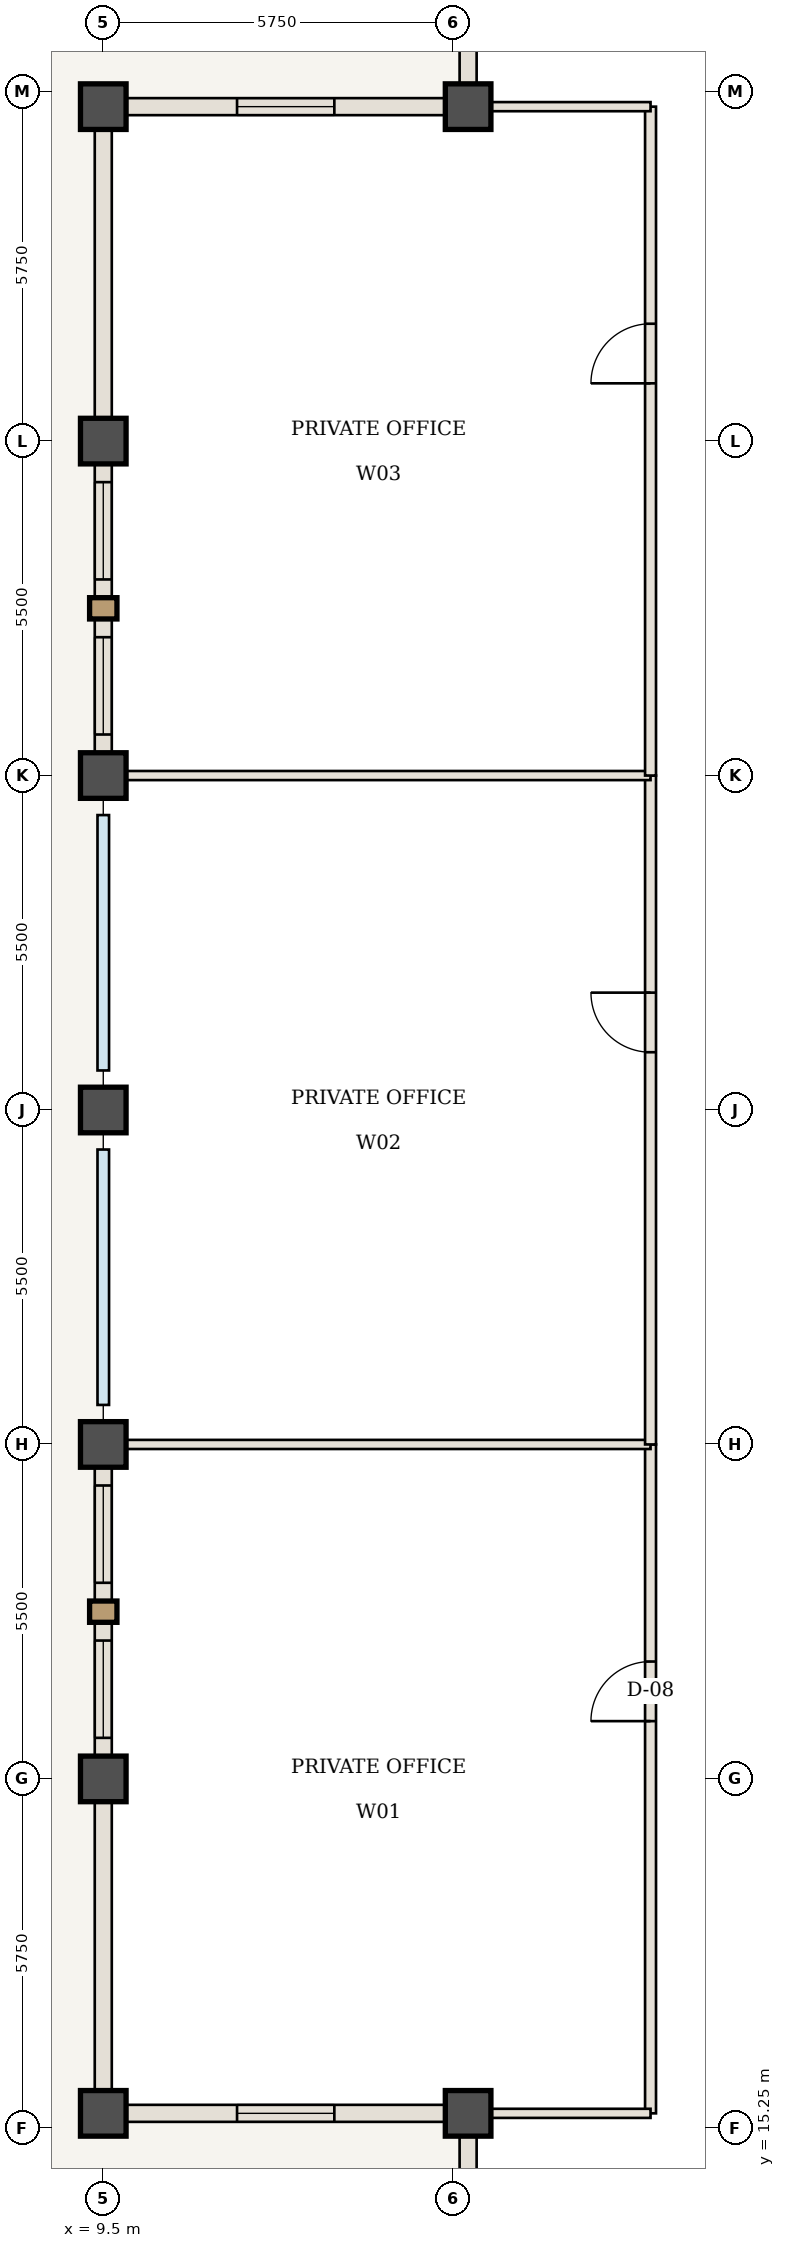
"""IFC4 building model, lengths in metres.
Left out: names, types, materials, properties, quantities, classifications, styles, units other than length and angle.
Written with IfcOpenShell. Run it as: python <this file> out.ifc"""

import sys

from ifc_helpers import new_model, si_unit, direction, frame, frame_2d, origin, origin_2d, place, context, subcontext, project, spatial, rectangle, extrude, element, fill, save


model = new_model("IFC4")
c1 = context("Model", 3, precision=1e-05, world=origin(), true_north=direction((0.0, 1.0)))
c2 = subcontext(c1, "Body", "Model", "MODEL_VIEW")
j1 = project(units=[si_unit("LENGTHUNIT", "METRE"), si_unit("PLANEANGLEUNIT", "RADIAN")], contexts=[c1])
p1 = place(None, origin())
s1 = spatial("IfcSite", under=j1, at=p1, CompositionType="ELEMENT")
p2 = place(p1, origin())
s2 = spatial("IfcBuilding", under=s1, at=p2, CompositionType="ELEMENT")
p3 = place(p2, frame((0.0, 0.0, 257.6)))
s3 = spatial("IfcBuildingStorey", under=s2, at=p3, CompositionType="ELEMENT", Elevation=257.6)
for number, where, z_axis, x_axis in (
    (1, (15.5, 15.5, -0.42), (0.0, 0.0, 1.0), (1.0, 0.0, 0.0)),
    (2, (9.5, 15.5, -0.42), (0.0, 0.0, 1.0), (1.0, 0.0, 0.0)),
    (3, (15.5, 48.5, -0.42), (0.0, 0.0, 1.0), (1.0, 0.0, 0.0)),
    (4, (9.5, 48.5, -0.42), (0.0, 0.0, 1.0), (1.0, 0.0, 0.0)),
    (5, (9.5, 21.0, -0.42), (0.0, 0.0, 1.0), (1.0, 0.0, 0.0)),
    (6, (9.5, 26.5, -0.42), (0.0, 0.0, 1.0), (1.0, 0.0, 0.0)),
    (7, (9.5, 32.0, -0.42), (0.0, 0.0, 1.0), (1.0, 0.0, 0.0)),
    (8, (9.5, 37.5, -0.42), (0.0, 0.0, 1.0), (1.0, 0.0, 0.0)),
    (9, (9.5, 43.0, -0.42), (0.0, 0.0, 1.0), (1.0, 0.0, 0.0)),
):
    element("IfcColumn", number, at=place(p3, frame(where, z_axis=z_axis, x_axis=x_axis)), inside=s3, PredefinedType="COLUMN", context=c2, shape_type="SweptSolid", body=[
        extrude(rectangle(XDim=0.75, YDim=0.75, at=origin_2d()), origin(), (0.0, 0.0, 1.0), 4.97),
    ])
p4 = place(p3, frame((18.5, 15.5, 0.0), z_axis=(0.0, 0.0, 1.0), x_axis=(0.0, 1.0, 0.0)))
e10 = element("IfcWall", 10, at=p4, inside=s3, PredefinedType="STANDARD", context=c2, shape_type="SweptSolid", body=[
    extrude(rectangle(XDim=11.0, YDim=0.18, at=frame_2d((5.5, 0.0))), origin(), (0.0, 0.0, 1.0), 4.13),
])
p5 = place(p4, frame((6.45, 0.0, 0.0)))
e11 = element("IfcOpeningElement", 11, at=p5, cuts=e10, PredefinedType="OPENING", context=c2, shape_type="SweptSolid", body=[
    extrude(rectangle(XDim=0.98, YDim=2.2, at=frame_2d((0.49, 1.1))), frame((0.0, 0.1, 0.0), z_axis=(0.0, -1.0, 0.0), x_axis=(1.0, 0.0, 0.0)), (0.0, 0.0, 1.0), 0.2),
])
p6 = place(p3, frame((9.56, 26.5, 0.0), z_axis=(0.0, 0.0, 1.0), x_axis=(1.0, 0.0, 0.0)))
e12 = element("IfcWall", 12, at=p6, inside=s3, PredefinedType="STANDARD", context=c2, shape_type="SweptSolid", body=[
    extrude(rectangle(XDim=8.94, YDim=0.15, at=frame_2d((4.47, 0.0))), origin(), (0.0, 0.0, 1.0), 4.13),
])
p7 = place(p3, frame((18.5, 26.5, 0.0), z_axis=(0.0, 0.0, 1.0), x_axis=(0.0, 1.0, 0.0)))
e13 = element("IfcWall", 13, at=p7, inside=s3, PredefinedType="STANDARD", context=c2, shape_type="SweptSolid", body=[
    extrude(rectangle(XDim=11.0, YDim=0.18, at=frame_2d((5.5, 0.0))), origin(), (0.0, 0.0, 1.0), 4.13),
])
p8 = place(p7, frame((6.45, 0.0, 0.0)))
e14 = element("IfcOpeningElement", 14, at=p8, cuts=e13, PredefinedType="OPENING", context=c2, shape_type="SweptSolid", body=[
    extrude(rectangle(XDim=0.98, YDim=2.2, at=frame_2d((0.49, 1.1))), frame((0.0, 0.1, 0.0), z_axis=(0.0, -1.0, 0.0), x_axis=(1.0, 0.0, 0.0)), (0.0, 0.0, 1.0), 0.2),
])
p9 = place(p3, frame((9.56, 37.5, 0.0), z_axis=(0.0, 0.0, 1.0), x_axis=(1.0, 0.0, 0.0)))
e15 = element("IfcWall", 15, at=p9, inside=s3, PredefinedType="STANDARD", context=c2, shape_type="SweptSolid", body=[
    extrude(rectangle(XDim=8.94, YDim=0.15, at=frame_2d((4.47, 0.0))), origin(), (0.0, 0.0, 1.0), 4.13),
])
p10 = place(p3, frame((18.5, 37.5, 0.0), z_axis=(0.0, 0.0, 1.0), x_axis=(0.0, 1.0, 0.0)))
e16 = element("IfcWall", 16, at=p10, inside=s3, PredefinedType="STANDARD", context=c2, shape_type="SweptSolid", body=[
    extrude(rectangle(XDim=11.0, YDim=0.18, at=frame_2d((5.5, 0.0))), origin(), (0.0, 0.0, 1.0), 4.13),
])
p11 = place(p10, frame((6.45, 0.0, 0.0)))
e17 = element("IfcOpeningElement", 17, at=p11, cuts=e16, PredefinedType="OPENING", context=c2, shape_type="SweptSolid", body=[
    extrude(rectangle(XDim=0.98, YDim=2.2, at=frame_2d((0.49, 1.1))), frame((0.0, 0.1, 0.0), z_axis=(0.0, -1.0, 0.0), x_axis=(1.0, 0.0, 0.0)), (0.0, 0.0, 1.0), 0.2),
])
for number, where, z_axis, x_axis in (
    (18, (15.5, 15.5, 0.0), (0.0, 0.0, 1.0), (1.0, 0.0, 0.0)),
    (19, (15.5, 48.5, 0.0), (0.0, 0.0, 1.0), (1.0, 0.0, 0.0)),
):
    element("IfcWall", number, at=place(p3, frame(where, z_axis=z_axis, x_axis=x_axis)), inside=s3, PredefinedType="STANDARD", context=c2, shape_type="SweptSolid", body=[
        extrude(rectangle(XDim=3.0, YDim=0.15, at=frame_2d((1.5, 0.0))), origin(), (0.0, 0.0, 1.0), 4.13),
    ])
p12 = place(p3, frame((9.5, 15.5, 0.0), z_axis=(0.0, 0.0, 1.0), x_axis=(0.0, 1.0, 0.0)))
e20 = element("IfcWall", 20, at=p12, inside=s3, PredefinedType="USERDEFINED", context=c2, shape_type="SweptSolid", body=[
    extrude(rectangle(XDim=5.5, YDim=0.28, at=frame_2d((2.75, 0.0))), origin(), (0.0, 0.0, 1.0), 3.43),
])
p13 = place(p3, frame((9.5, 21.0, 0.0), z_axis=(0.0, 0.0, 1.0), x_axis=(0.0, 1.0, 0.0)))
e21 = element("IfcWall", 21, at=p13, inside=s3, PredefinedType="USERDEFINED", context=c2, shape_type="SweptSolid", body=[
    extrude(rectangle(XDim=5.5, YDim=0.28, at=frame_2d((2.75, 0.0))), origin(), (0.0, 0.0, 1.0), 3.43),
])
p14 = place(p13, frame((0.675, 0.0, 0.85)))
e22 = element("IfcOpeningElement", 22, at=p14, cuts=e21, PredefinedType="OPENING", context=c2, shape_type="SweptSolid", body=[
    extrude(rectangle(XDim=1.6, YDim=2.15, at=frame_2d((0.8, 1.075))), frame((0.0, 0.15, 0.0), z_axis=(0.0, -1.0, 0.0), x_axis=(1.0, 0.0, 0.0)), (0.0, 0.0, 1.0), 0.3),
])
p15 = place(p13, frame((3.225, 0.0, 0.85)))
e23 = element("IfcOpeningElement", 23, at=p15, cuts=e21, PredefinedType="OPENING", context=c2, shape_type="SweptSolid", body=[
    extrude(rectangle(XDim=1.6, YDim=2.15, at=frame_2d((0.8, 1.075))), frame((0.0, 0.15, 0.0), z_axis=(0.0, -1.0, 0.0), x_axis=(1.0, 0.0, 0.0)), (0.0, 0.0, 1.0), 0.3),
])
p16 = place(p3, frame((9.5, 37.5, 0.0), z_axis=(0.0, 0.0, 1.0), x_axis=(0.0, 1.0, 0.0)))
e24 = element("IfcWall", 24, at=p16, inside=s3, PredefinedType="USERDEFINED", context=c2, shape_type="SweptSolid", body=[
    extrude(rectangle(XDim=5.5, YDim=0.28, at=frame_2d((2.75, 0.0))), origin(), (0.0, 0.0, 1.0), 3.43),
])
p17 = place(p16, frame((0.675, 0.0, 0.85)))
e25 = element("IfcOpeningElement", 25, at=p17, cuts=e24, PredefinedType="OPENING", context=c2, shape_type="SweptSolid", body=[
    extrude(rectangle(XDim=1.6, YDim=2.15, at=frame_2d((0.8, 1.075))), frame((0.0, 0.15, 0.0), z_axis=(0.0, -1.0, 0.0), x_axis=(1.0, 0.0, 0.0)), (0.0, 0.0, 1.0), 0.3),
])
p18 = place(p16, frame((3.225, 0.0, 0.85)))
e26 = element("IfcOpeningElement", 26, at=p18, cuts=e24, PredefinedType="OPENING", context=c2, shape_type="SweptSolid", body=[
    extrude(rectangle(XDim=1.6, YDim=2.15, at=frame_2d((0.8, 1.075))), frame((0.0, 0.15, 0.0), z_axis=(0.0, -1.0, 0.0), x_axis=(1.0, 0.0, 0.0)), (0.0, 0.0, 1.0), 0.3),
])
p19 = place(p3, frame((9.5, 43.0, 0.0), z_axis=(0.0, 0.0, 1.0), x_axis=(0.0, 1.0, 0.0)))
e27 = element("IfcWall", 27, at=p19, inside=s3, PredefinedType="USERDEFINED", context=c2, shape_type="SweptSolid", body=[
    extrude(rectangle(XDim=5.5, YDim=0.28, at=frame_2d((2.75, 0.0))), origin(), (0.0, 0.0, 1.0), 3.43),
])
p20 = place(p3, frame((15.5, 9.5, 0.0), z_axis=(0.0, 0.0, 1.0), x_axis=(0.0, 1.0, 0.0)))
e28 = element("IfcWall", 28, at=p20, inside=s3, PredefinedType="USERDEFINED", context=c2, shape_type="SweptSolid", body=[
    extrude(rectangle(XDim=6.0, YDim=0.28, at=frame_2d((3.0, 0.0))), origin(), (0.0, 0.0, 1.0), 3.43),
])
p21 = place(p20, frame((2.2, 0.0, 0.85)))
e29 = element("IfcOpeningElement", 29, at=p21, cuts=e28, PredefinedType="OPENING", context=c2, shape_type="SweptSolid", body=[
    extrude(rectangle(XDim=1.6, YDim=2.05, at=frame_2d((0.8, 1.025))), frame((0.0, 0.15, 0.0), z_axis=(0.0, -1.0, 0.0), x_axis=(1.0, 0.0, 0.0)), (0.0, 0.0, 1.0), 0.3),
])
p22 = place(p3, frame((15.5, 15.5, 0.0), z_axis=(0.0, 0.0, 1.0), x_axis=(-1.0, 0.0, 0.0)))
e30 = element("IfcWall", 30, at=p22, inside=s3, PredefinedType="USERDEFINED", context=c2, shape_type="SweptSolid", body=[
    extrude(rectangle(XDim=6.0, YDim=0.28, at=frame_2d((3.0, 0.0))), origin(), (0.0, 0.0, 1.0), 3.43),
])
p23 = place(p22, frame((2.2, 0.0, 0.85)))
e31 = element("IfcOpeningElement", 31, at=p23, cuts=e30, PredefinedType="OPENING", context=c2, shape_type="SweptSolid", body=[
    extrude(rectangle(XDim=1.6, YDim=2.05, at=frame_2d((0.8, 1.025))), frame((0.0, 0.15, 0.0), z_axis=(0.0, -1.0, 0.0), x_axis=(1.0, 0.0, 0.0)), (0.0, 0.0, 1.0), 0.3),
])
p24 = place(p3, frame((15.5, 48.5, 0.0), z_axis=(0.0, 0.0, 1.0), x_axis=(0.0, 1.0, 0.0)))
e32 = element("IfcWall", 32, at=p24, inside=s3, PredefinedType="USERDEFINED", context=c2, shape_type="SweptSolid", body=[
    extrude(rectangle(XDim=6.0, YDim=0.28, at=frame_2d((3.0, 0.0))), origin(), (0.0, 0.0, 1.0), 3.43),
])
p25 = place(p24, frame((2.2, 0.0, 0.85)))
e33 = element("IfcOpeningElement", 33, at=p25, cuts=e32, PredefinedType="OPENING", context=c2, shape_type="SweptSolid", body=[
    extrude(rectangle(XDim=1.6, YDim=2.05, at=frame_2d((0.8, 1.025))), frame((0.0, 0.15, 0.0), z_axis=(0.0, -1.0, 0.0), x_axis=(1.0, 0.0, 0.0)), (0.0, 0.0, 1.0), 0.3),
])
p26 = place(p3, frame((9.5, 48.5, 0.0), z_axis=(0.0, 0.0, 1.0), x_axis=(1.0, 0.0, 0.0)))
e34 = element("IfcWall", 34, at=p26, inside=s3, PredefinedType="USERDEFINED", context=c2, shape_type="SweptSolid", body=[
    extrude(rectangle(XDim=6.0, YDim=0.28, at=frame_2d((3.0, 0.0))), origin(), (0.0, 0.0, 1.0), 3.43),
])
p27 = place(p26, frame((2.2, 0.0, 0.85)))
e35 = element("IfcOpeningElement", 35, at=p27, cuts=e34, PredefinedType="OPENING", context=c2, shape_type="SweptSolid", body=[
    extrude(rectangle(XDim=1.6, YDim=2.05, at=frame_2d((0.8, 1.025))), frame((0.0, 0.15, 0.0), z_axis=(0.0, -1.0, 0.0), x_axis=(1.0, 0.0, 0.0)), (0.0, 0.0, 1.0), 0.3),
])
p28 = place(p5, origin())
e36 = element("IfcDoor", 36, at=p28, inside=s3, OperationType="SINGLE_SWING_LEFT", PredefinedType="DOOR", context=c2, shape_type="SweptSolid", body=[
    extrude(rectangle(XDim=0.98, YDim=2.2, at=frame_2d((0.49, 1.1))), frame((0.0, 0.025, 0.0), z_axis=(0.0, -1.0, 0.0), x_axis=(1.0, 0.0, 0.0)), (0.0, 0.0, 1.0), 0.05),
])
fill(e11, e36)
p29 = place(p8, origin())
e37 = element("IfcDoor", 37, at=p29, inside=s3, OperationType="SINGLE_SWING_RIGHT", PredefinedType="DOOR", context=c2, shape_type="SweptSolid", body=[
    extrude(rectangle(XDim=0.98, YDim=2.2, at=frame_2d((0.49, 1.1))), frame((0.0, 0.025, 0.0), z_axis=(0.0, -1.0, 0.0), x_axis=(1.0, 0.0, 0.0)), (0.0, 0.0, 1.0), 0.05),
])
fill(e14, e37)
p30 = place(p11, origin())
e38 = element("IfcDoor", 38, at=p30, inside=s3, OperationType="SINGLE_SWING_LEFT", PredefinedType="DOOR", context=c2, shape_type="SweptSolid", body=[
    extrude(rectangle(XDim=0.98, YDim=2.2, at=frame_2d((0.49, 1.1))), frame((0.0, 0.025, 0.0), z_axis=(0.0, -1.0, 0.0), x_axis=(1.0, 0.0, 0.0)), (0.0, 0.0, 1.0), 0.05),
])
fill(e17, e38)
p31 = place(p14, origin())
e39 = element("IfcWindow", 39, at=p31, inside=s3, PartitioningType="SINGLE_PANEL", PredefinedType="WINDOW", context=c2, shape_type="SweptSolid", body=[
    extrude(rectangle(XDim=1.6, YDim=2.15, at=frame_2d((0.8, 1.075))), frame((0.0, 0.03, 0.0), z_axis=(0.0, -1.0, 0.0), x_axis=(1.0, 0.0, 0.0)), (0.0, 0.0, 1.0), 0.06),
])
fill(e22, e39)
p32 = place(p15, origin())
e40 = element("IfcWindow", 40, at=p32, inside=s3, PartitioningType="SINGLE_PANEL", PredefinedType="WINDOW", context=c2, shape_type="SweptSolid", body=[
    extrude(rectangle(XDim=1.6, YDim=2.15, at=frame_2d((0.8, 1.075))), frame((0.0, 0.03, 0.0), z_axis=(0.0, -1.0, 0.0), x_axis=(1.0, 0.0, 0.0)), (0.0, 0.0, 1.0), 0.06),
])
fill(e23, e40)
p33 = place(p17, origin())
e41 = element("IfcWindow", 41, at=p33, inside=s3, PartitioningType="SINGLE_PANEL", PredefinedType="WINDOW", context=c2, shape_type="SweptSolid", body=[
    extrude(rectangle(XDim=1.6, YDim=2.15, at=frame_2d((0.8, 1.075))), frame((0.0, 0.03, 0.0), z_axis=(0.0, -1.0, 0.0), x_axis=(1.0, 0.0, 0.0)), (0.0, 0.0, 1.0), 0.06),
])
fill(e25, e41)
p34 = place(p18, origin())
e42 = element("IfcWindow", 42, at=p34, inside=s3, PartitioningType="SINGLE_PANEL", PredefinedType="WINDOW", context=c2, shape_type="SweptSolid", body=[
    extrude(rectangle(XDim=1.6, YDim=2.15, at=frame_2d((0.8, 1.075))), frame((0.0, 0.03, 0.0), z_axis=(0.0, -1.0, 0.0), x_axis=(1.0, 0.0, 0.0)), (0.0, 0.0, 1.0), 0.06),
])
fill(e26, e42)
p35 = place(p23, origin())
e43 = element("IfcWindow", 43, at=p35, inside=s3, PartitioningType="SINGLE_PANEL", PredefinedType="WINDOW", context=c2, shape_type="SweptSolid", body=[
    extrude(rectangle(XDim=1.6, YDim=2.05, at=frame_2d((0.8, 1.025))), frame((0.0, 0.03, 0.0), z_axis=(0.0, -1.0, 0.0), x_axis=(1.0, 0.0, 0.0)), (0.0, 0.0, 1.0), 0.06),
])
fill(e31, e43)
p36 = place(p27, origin())
e44 = element("IfcWindow", 44, at=p36, inside=s3, PartitioningType="SINGLE_PANEL", PredefinedType="WINDOW", context=c2, shape_type="SweptSolid", body=[
    extrude(rectangle(XDim=1.6, YDim=2.05, at=frame_2d((0.8, 1.025))), frame((0.0, 0.03, 0.0), z_axis=(0.0, -1.0, 0.0), x_axis=(1.0, 0.0, 0.0)), (0.0, 0.0, 1.0), 0.06),
])
fill(e35, e44)
save(model, sys.argv[1])
